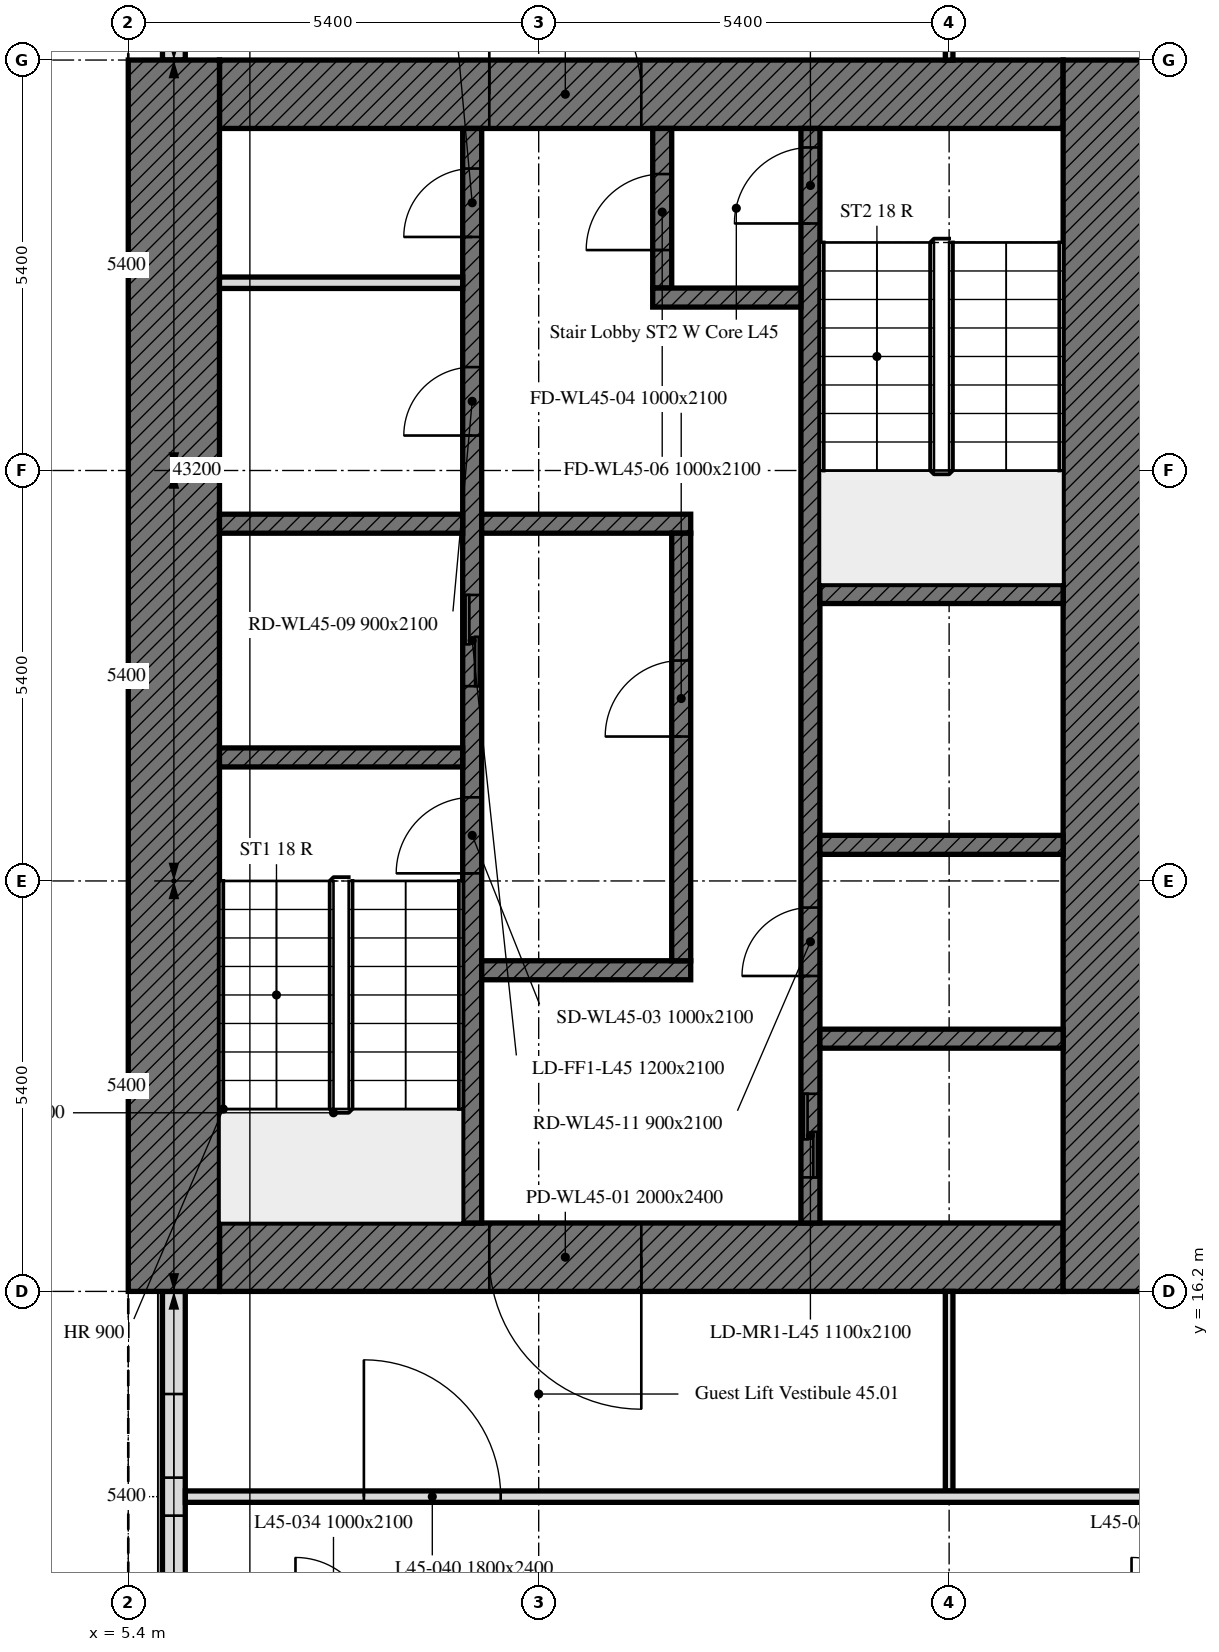
"""IFC4 building model, lengths in metres.
Left out: names, types, materials, properties, quantities, classifications, styles, units other than length and angle.
Written with IfcOpenShell. Run it as: python <this file> out.ifc"""

import sys

from ifc_helpers import new_model, si_unit, direction, frame, frame_2d, origin, place, context, subcontext, project, spatial, rectangle, extrude, element, fill, save


model = new_model("IFC4")
c1 = context("Model", 3, precision=1e-05, world=origin(), true_north=direction((0.0, 1.0)))
c2 = subcontext(c1, "Body", "Model", "MODEL_VIEW")
j1 = project(units=[si_unit("LENGTHUNIT", "METRE"), si_unit("PLANEANGLEUNIT", "RADIAN")], contexts=[c1])
p1 = place(None, origin())
s1 = spatial("IfcSite", under=j1, at=p1, CompositionType="ELEMENT")
p2 = place(p1, origin())
s2 = spatial("IfcBuilding", under=s1, at=p2, CompositionType="ELEMENT")
p3 = place(p2, frame((0.0, 0.0, 187.3)))
s3 = spatial("IfcBuildingStorey", under=s2, at=p3, CompositionType="ELEMENT", Elevation=187.3)
p4 = place(p3, frame((6.0, 43.014, 0.0), z_axis=(0.0, 0.0, 1.0), x_axis=(0.0, -1.0, 0.0)))
e1 = element("IfcWall", 1, at=p4, inside=s3, PredefinedType="SOLIDWALL", context=c2, shape_type="SweptSolid", body=[
    extrude(rectangle(XDim=10.614, YDim=0.3, at=frame_2d((5.307, 0.0))), origin(), (0.0, 0.0, 1.0), 3.0),
])
p5 = place(p4, frame((1.164, 0.0, 0.9)))
e2 = element("IfcOpeningElement", 2, at=p5, cuts=e1, PredefinedType="OPENING", context=c2, shape_type="SweptSolid", body=[
    extrude(rectangle(XDim=1.1, YDim=1.7, at=frame_2d((0.55, 0.85))), frame((0.0, 0.16, 0.0), z_axis=(0.0, -1.0, 0.0), x_axis=(1.0, 0.0, 0.0)), (0.0, 0.0, 1.0), 0.32),
])
p6 = place(p4, frame((2.764, 0.0, 0.9)))
e3 = element("IfcOpeningElement", 3, at=p6, cuts=e1, PredefinedType="OPENING", context=c2, shape_type="SweptSolid", body=[
    extrude(rectangle(XDim=1.1, YDim=1.7, at=frame_2d((0.55, 0.85))), frame((0.0, 0.16, 0.0), z_axis=(0.0, -1.0, 0.0), x_axis=(1.0, 0.0, 0.0)), (0.0, 0.0, 1.0), 0.32),
])
p7 = place(p4, frame((6.564, 0.0, 0.9)))
e4 = element("IfcOpeningElement", 4, at=p7, cuts=e1, PredefinedType="OPENING", context=c2, shape_type="SweptSolid", body=[
    extrude(rectangle(XDim=1.1, YDim=1.7, at=frame_2d((0.55, 0.85))), frame((0.0, 0.16, 0.0), z_axis=(0.0, -1.0, 0.0), x_axis=(1.0, 0.0, 0.0)), (0.0, 0.0, 1.0), 0.32),
])
p8 = place(p4, frame((8.164, 0.0, 0.9)))
e5 = element("IfcOpeningElement", 5, at=p8, cuts=e1, PredefinedType="OPENING", context=c2, shape_type="SweptSolid", body=[
    extrude(rectangle(XDim=1.1, YDim=1.7, at=frame_2d((0.55, 0.85))), frame((0.0, 0.16, 0.0), z_axis=(0.0, -1.0, 0.0), x_axis=(1.0, 0.0, 0.0)), (0.0, 0.0, 1.0), 0.32),
])
p9 = place(p3, frame((6.0, 16.2, 0.0), z_axis=(0.0, 0.0, 1.0), x_axis=(0.0, -1.0, 0.0)))
e6 = element("IfcWall", 6, at=p9, inside=s3, PredefinedType="SOLIDWALL", context=c2, shape_type="SweptSolid", body=[
    extrude(rectangle(XDim=5.214, YDim=0.3, at=frame_2d((2.607, 0.0))), origin(), (0.0, 0.0, 1.0), 3.0),
])
p10 = place(p9, frame((1.35, 0.0, 0.9)))
e7 = element("IfcOpeningElement", 7, at=p10, cuts=e6, PredefinedType="OPENING", context=c2, shape_type="SweptSolid", body=[
    extrude(rectangle(XDim=1.1, YDim=1.7, at=frame_2d((0.55, 0.85))), frame((0.0, 0.16, 0.0), z_axis=(0.0, -1.0, 0.0), x_axis=(1.0, 0.0, 0.0)), (0.0, 0.0, 1.0), 0.32),
])
p11 = place(p9, frame((2.95, 0.0, 0.9)))
e8 = element("IfcOpeningElement", 8, at=p11, cuts=e6, PredefinedType="OPENING", context=c2, shape_type="SweptSolid", body=[
    extrude(rectangle(XDim=1.1, YDim=1.7, at=frame_2d((0.55, 0.85))), frame((0.0, 0.16, 0.0), z_axis=(0.0, -1.0, 0.0), x_axis=(1.0, 0.0, 0.0)), (0.0, 0.0, 1.0), 0.32),
])
p12 = place(p3, frame((17.7, 16.65, 0.0), z_axis=(0.0, 0.0, 1.0), x_axis=(-1.0, 0.0, 0.0)))
e9 = element("IfcWall", 9, at=p12, inside=s3, PredefinedType="SOLIDWALL", context=c2, shape_type="SweptSolid", body=[
    extrude(rectangle(XDim=11.1, YDim=0.9, at=frame_2d((5.55, 0.0))), origin(), (0.0, 0.0, 1.0), 3.0),
])
p13 = place(p12, frame((5.55, 0.0, 0.0)))
e10 = element("IfcOpeningElement", 10, at=p13, cuts=e9, PredefinedType="OPENING", context=c2, shape_type="SweptSolid", body=[
    extrude(rectangle(XDim=2.0, YDim=2.4, at=frame_2d((1.0, 1.2))), frame((0.0, 0.45, 0.0), z_axis=(0.0, -1.0, 0.0), x_axis=(1.0, 0.0, 0.0)), (0.0, 0.0, 1.0), 0.9),
])
p14 = place(p3, frame((6.6, 31.95, 0.0), z_axis=(0.0, 0.0, 1.0), x_axis=(1.0, 0.0, 0.0)))
e11 = element("IfcWall", 11, at=p14, inside=s3, PredefinedType="SOLIDWALL", context=c2, shape_type="SweptSolid", body=[
    extrude(rectangle(XDim=11.1, YDim=0.9, at=frame_2d((5.55, 0.0))), origin(), (0.0, 0.0, 1.0), 3.0),
])
p15 = place(p14, frame((3.55, 0.0, 0.0)))
e12 = element("IfcOpeningElement", 12, at=p15, cuts=e11, PredefinedType="OPENING", context=c2, shape_type="SweptSolid", body=[
    extrude(rectangle(XDim=2.0, YDim=2.4, at=frame_2d((1.0, 1.2))), frame((0.0, 0.45, 0.0), z_axis=(0.0, -1.0, 0.0), x_axis=(1.0, 0.0, 0.0)), (0.0, 0.0, 1.0), 0.9),
])
for number, where, z_axis, x_axis in (
    (13, (6.0, 16.2, 0.0), (0.0, 0.0, 1.0), (0.0, 1.0, 0.0)),
    (14, (18.3, 32.4, 0.0), (0.0, 0.0, 1.0), (0.0, -1.0, 0.0)),
):
    element("IfcWall", number, at=place(p3, frame(where, z_axis=z_axis, x_axis=x_axis)), inside=s3, PredefinedType="SOLIDWALL", context=c2, shape_type="SweptSolid", body=[
        extrude(rectangle(XDim=16.2, YDim=1.2, at=frame_2d((8.1, 0.0))), origin(), (0.0, 0.0, 1.0), 3.0),
    ])
p16 = place(p3, frame((9.925, 17.1, 0.0), z_axis=(0.0, 0.0, 1.0), x_axis=(0.0, 1.0, 0.0)))
e15 = element("IfcWall", 15, at=p16, inside=s3, PredefinedType="SOLIDWALL", context=c2, shape_type="SweptSolid", body=[
    extrude(rectangle(XDim=14.4, YDim=0.25, at=frame_2d((7.2, 0.0))), origin(), (0.0, 0.0, 1.0), 3.0),
])
p17 = place(p16, frame((4.6, 0.0, 0.0)))
e16 = element("IfcOpeningElement", 16, at=p17, cuts=e15, PredefinedType="OPENING", context=c2, shape_type="SweptSolid", body=[
    extrude(rectangle(XDim=1.0, YDim=2.1, at=frame_2d((0.5, 1.05))), frame((0.0, 0.125, 0.0), z_axis=(0.0, -1.0, 0.0), x_axis=(1.0, 0.0, 0.0)), (0.0, 0.0, 1.0), 0.25),
])
p18 = place(p16, frame((7.062, 0.0, 0.0)))
e17 = element("IfcOpeningElement", 17, at=p18, cuts=e15, PredefinedType="OPENING", context=c2, shape_type="SweptSolid", body=[
    extrude(rectangle(XDim=1.2, YDim=2.1, at=frame_2d((0.6, 1.05))), frame((0.0, 0.125, 0.0), z_axis=(0.0, -1.0, 0.0), x_axis=(1.0, 0.0, 0.0)), (0.0, 0.0, 1.0), 0.25),
])
p19 = place(p16, frame((10.36, 0.0, 0.0)))
e18 = element("IfcOpeningElement", 18, at=p19, cuts=e15, PredefinedType="OPENING", context=c2, shape_type="SweptSolid", body=[
    extrude(rectangle(XDim=0.9, YDim=2.1, at=frame_2d((0.45, 1.05))), frame((0.0, 0.125, 0.0), z_axis=(0.0, -1.0, 0.0), x_axis=(1.0, 0.0, 0.0)), (0.0, 0.0, 1.0), 0.25),
])
p20 = place(p16, frame((12.972, 0.0, 0.0)))
e19 = element("IfcOpeningElement", 19, at=p20, cuts=e15, PredefinedType="OPENING", context=c2, shape_type="SweptSolid", body=[
    extrude(rectangle(XDim=0.9, YDim=2.1, at=frame_2d((0.45, 1.05))), frame((0.0, 0.125, 0.0), z_axis=(0.0, -1.0, 0.0), x_axis=(1.0, 0.0, 0.0)), (0.0, 0.0, 1.0), 0.25),
])
p21 = place(p3, frame((14.375, 17.1, 0.0), z_axis=(0.0, 0.0, 1.0), x_axis=(0.0, 1.0, 0.0)))
e20 = element("IfcWall", 20, at=p21, inside=s3, PredefinedType="SOLIDWALL", context=c2, shape_type="SweptSolid", body=[
    extrude(rectangle(XDim=14.4, YDim=0.25, at=frame_2d((7.2, 0.0))), origin(), (0.0, 0.0, 1.0), 3.0),
])
p22 = place(p21, frame((13.15, 0.0, 0.0)))
e21 = element("IfcOpeningElement", 21, at=p22, cuts=e20, PredefinedType="OPENING", context=c2, shape_type="SweptSolid", body=[
    extrude(rectangle(XDim=1.0, YDim=2.1, at=frame_2d((0.5, 1.05))), frame((0.0, 0.125, 0.0), z_axis=(0.0, -1.0, 0.0), x_axis=(1.0, 0.0, 0.0)), (0.0, 0.0, 1.0), 0.25),
])
p23 = place(p21, frame((0.6, 0.0, 0.0)))
e22 = element("IfcOpeningElement", 22, at=p23, cuts=e20, PredefinedType="OPENING", context=c2, shape_type="SweptSolid", body=[
    extrude(rectangle(XDim=1.1, YDim=2.1, at=frame_2d((0.55, 1.05))), frame((0.0, 0.125, 0.0), z_axis=(0.0, -1.0, 0.0), x_axis=(1.0, 0.0, 0.0)), (0.0, 0.0, 1.0), 0.25),
])
p24 = place(p21, frame((3.25, 0.0, 0.0)))
e23 = element("IfcOpeningElement", 23, at=p24, cuts=e20, PredefinedType="OPENING", context=c2, shape_type="SweptSolid", body=[
    extrude(rectangle(XDim=0.9, YDim=2.1, at=frame_2d((0.45, 1.05))), frame((0.0, 0.125, 0.0), z_axis=(0.0, -1.0, 0.0), x_axis=(1.0, 0.0, 0.0)), (0.0, 0.0, 1.0), 0.25),
])
for number, where, z_axis, x_axis in (
    (24, (6.6, 23.225, 0.0), (0.0, 0.0, 1.0), (1.0, 0.0, 0.0)),
    (25, (14.5, 25.375, 0.0), (0.0, 0.0, 1.0), (1.0, 0.0, 0.0)),
    (26, (14.5, 22.075, 0.0), (0.0, 0.0, 1.0), (1.0, 0.0, 0.0)),
    (27, (6.6, 26.3, 0.0), (0.0, 0.0, 1.0), (1.0, 0.0, 0.0)),
):
    element("IfcWall", number, at=place(p3, frame(where, z_axis=z_axis, x_axis=x_axis)), inside=s3, PredefinedType="SOLIDWALL", context=c2, shape_type="SweptSolid", body=[
        extrude(rectangle(XDim=3.2, YDim=0.25, at=frame_2d((1.6, 0.0))), origin(), (0.0, 0.0, 1.0), 3.0),
    ])
for number, where, z_axis, x_axis in (
    (28, (10.05, 26.3, 0.0), (0.0, 0.0, 1.0), (1.0, 0.0, 0.0)),
    (29, (10.05, 20.425, 0.0), (0.0, 0.0, 1.0), (1.0, 0.0, 0.0)),
):
    element("IfcWall", number, at=place(p3, frame(where, z_axis=z_axis, x_axis=x_axis)), inside=s3, PredefinedType="SOLIDWALL", context=c2, shape_type="SweptSolid", body=[
        extrude(rectangle(XDim=2.75, YDim=0.25, at=frame_2d((1.375, 0.0))), origin(), (0.0, 0.0, 1.0), 3.0),
    ])
p25 = place(p3, frame((12.425, 29.4, 0.0), z_axis=(0.0, 0.0, 1.0), x_axis=(0.0, 1.0, 0.0)))
e30 = element("IfcWall", 30, at=p25, inside=s3, PredefinedType="SOLIDWALL", context=c2, shape_type="SweptSolid", body=[
    extrude(rectangle(XDim=2.1, YDim=0.25, at=frame_2d((1.05, 0.0))), origin(), (0.0, 0.0, 1.0), 3.0),
])
p26 = place(p25, frame((0.5, 0.0, 0.0)))
e31 = element("IfcOpeningElement", 31, at=p26, cuts=e30, PredefinedType="OPENING", context=c2, shape_type="SweptSolid", body=[
    extrude(rectangle(XDim=1.0, YDim=2.1, at=frame_2d((0.5, 1.05))), frame((0.0, 0.125, 0.0), z_axis=(0.0, -1.0, 0.0), x_axis=(1.0, 0.0, 0.0)), (0.0, 0.0, 1.0), 0.25),
])
p27 = place(p3, frame((12.3, 29.275, 0.0), z_axis=(0.0, 0.0, 1.0), x_axis=(1.0, 0.0, 0.0)))
e32 = element("IfcWall", 32, at=p27, inside=s3, PredefinedType="SOLIDWALL", context=c2, shape_type="SweptSolid", body=[
    extrude(rectangle(XDim=1.95, YDim=0.25, at=frame_2d((0.975, 0.0))), origin(), (0.0, 0.0, 1.0), 3.0),
])
p28 = place(p3, frame((12.675, 20.55, 0.0), z_axis=(0.0, 0.0, 1.0), x_axis=(0.0, 1.0, 0.0)))
e33 = element("IfcWall", 33, at=p28, inside=s3, PredefinedType="SOLIDWALL", context=c2, shape_type="SweptSolid", body=[
    extrude(rectangle(XDim=5.625, YDim=0.25, at=frame_2d((2.812, 0.0))), origin(), (0.0, 0.0, 1.0), 3.0),
])
p29 = place(p28, frame((2.95, 0.0, 0.0)))
e34 = element("IfcOpeningElement", 34, at=p29, cuts=e33, PredefinedType="OPENING", context=c2, shape_type="SweptSolid", body=[
    extrude(rectangle(XDim=1.0, YDim=2.1, at=frame_2d((0.5, 1.05))), frame((0.0, 0.125, 0.0), z_axis=(0.0, -1.0, 0.0), x_axis=(1.0, 0.0, 0.0)), (0.0, 0.0, 1.0), 0.25),
])
p30 = place(p3, frame((14.5, 19.525, 0.0), z_axis=(0.0, 0.0, 1.0), x_axis=(1.0, 0.0, 0.0)))
e35 = element("IfcWall", 35, at=p30, inside=s3, PredefinedType="SOLIDWALL", context=c2, shape_type="SweptSolid", body=[
    extrude(rectangle(XDim=3.2, YDim=0.25, at=frame_2d((1.6, 0.0))), origin(), (0.0, 0.0, 1.0), 3.0),
])
p31 = place(p3, frame((6.6, 29.47, 0.0), z_axis=(0.0, 0.0, 1.0), x_axis=(1.0, 0.0, 0.0)))
e36 = element("IfcWall", 36, at=p31, inside=s3, PredefinedType="PARTITIONING", context=c2, shape_type="SweptSolid", body=[
    extrude(rectangle(XDim=3.2, YDim=0.15, at=frame_2d((1.6, 0.0))), origin(), (0.0, 0.0, 1.0), 3.0),
])
p32 = place(p3, frame((16.2, 37.38, 0.0), z_axis=(0.0, 0.0, 1.0), x_axis=(0.0, -1.0, 0.0)))
e37 = element("IfcWall", 37, at=p32, inside=s3, PredefinedType="PARTITIONING", context=c2, shape_type="SweptSolid", body=[
    extrude(rectangle(XDim=4.98, YDim=0.1, at=frame_2d((2.49, 0.0))), origin(), (0.0, 0.0, 1.0), 2.4),
])
p33 = place(p3, frame((16.2, 16.2, 0.0), z_axis=(0.0, 0.0, 1.0), x_axis=(0.0, -1.0, 0.0)))
e38 = element("IfcWall", 38, at=p33, inside=s3, PredefinedType="PARTITIONING", context=c2, shape_type="SweptSolid", body=[
    extrude(rectangle(XDim=2.625, YDim=0.1, at=frame_2d((1.312, 0.0))), origin(), (0.0, 0.0, 1.0), 3.0),
])
p34 = place(p3, frame((6.151, 13.5, 0.0), z_axis=(0.0, 0.0, 1.0), x_axis=(1.0, 0.0, 0.0)))
e39 = element("IfcWall", 39, at=p34, inside=s3, PredefinedType="PARTITIONING", context=c2, shape_type="SweptSolid", body=[
    extrude(rectangle(XDim=37.124, YDim=0.15, at=frame_2d((18.562, 0.0))), origin(), (0.0, 0.0, 1.0), 3.0),
])
p35 = place(p34, frame((17.649, 0.0, 0.0)))
e40 = element("IfcOpeningElement", 40, at=p35, cuts=e39, PredefinedType="OPENING", context=c2, shape_type="SweptSolid", body=[
    extrude(rectangle(XDim=1.0, YDim=2.1, at=frame_2d((0.5, 1.05))), frame((0.0, 0.075, 0.0), z_axis=(0.0, -1.0, 0.0), x_axis=(1.0, 0.0, 0.0)), (0.0, 0.0, 1.0), 0.15),
])
p36 = place(p34, frame((2.349, 0.0, 0.0)))
e41 = element("IfcOpeningElement", 41, at=p36, cuts=e39, PredefinedType="OPENING", context=c2, shape_type="SweptSolid", body=[
    extrude(rectangle(XDim=1.8, YDim=2.4, at=frame_2d((0.9, 1.2))), frame((0.0, 0.075, 0.0), z_axis=(0.0, -1.0, 0.0), x_axis=(1.0, 0.0, 0.0)), (0.0, 0.0, 1.0), 0.15),
])
p37 = place(p34, frame((29.349, 0.0, 0.0)))
e42 = element("IfcOpeningElement", 42, at=p37, cuts=e39, PredefinedType="OPENING", context=c2, shape_type="SweptSolid", body=[
    extrude(rectangle(XDim=1.8, YDim=2.4, at=frame_2d((0.9, 1.2))), frame((0.0, 0.075, 0.0), z_axis=(0.0, -1.0, 0.0), x_axis=(1.0, 0.0, 0.0)), (0.0, 0.0, 1.0), 0.15),
])
p38 = place(p10, origin())
e43 = element("IfcWindow", 43, at=p38, inside=s3, PartitioningType="SINGLE_PANEL", PredefinedType="WINDOW", context=c2, shape_type="SweptSolid", body=[
    extrude(rectangle(XDim=1.1, YDim=1.7, at=frame_2d((0.55, 0.85))), frame((0.0, 0.03, 0.0), z_axis=(0.0, -1.0, 0.0), x_axis=(1.0, 0.0, 0.0)), (0.0, 0.0, 1.0), 0.06),
])
fill(e7, e43)
p39 = place(p11, origin())
e44 = element("IfcWindow", 44, at=p39, inside=s3, PartitioningType="SINGLE_PANEL", PredefinedType="WINDOW", context=c2, shape_type="SweptSolid", body=[
    extrude(rectangle(XDim=1.1, YDim=1.7, at=frame_2d((0.55, 0.85))), frame((0.0, 0.03, 0.0), z_axis=(0.0, -1.0, 0.0), x_axis=(1.0, 0.0, 0.0)), (0.0, 0.0, 1.0), 0.06),
])
fill(e8, e44)
p40 = place(p13, origin())
e45 = element("IfcDoor", 45, at=p40, inside=s3, OperationType="DOUBLE_DOOR_SINGLE_SWING", PredefinedType="DOOR", context=c2, shape_type="SweptSolid", body=[
    extrude(rectangle(XDim=2.0, YDim=2.4, at=frame_2d((1.0, 1.2))), frame((0.0, 0.025, 0.0), z_axis=(0.0, -1.0, 0.0), x_axis=(1.0, 0.0, 0.0)), (0.0, 0.0, 1.0), 0.05),
])
fill(e10, e45)
p41 = place(p15, origin())
e46 = element("IfcDoor", 46, at=p41, inside=s3, OperationType="DOUBLE_DOOR_SINGLE_SWING", PredefinedType="DOOR", context=c2, shape_type="SweptSolid", body=[
    extrude(rectangle(XDim=2.0, YDim=2.4, at=frame_2d((1.0, 1.2))), frame((0.0, 0.025, 0.0), z_axis=(0.0, -1.0, 0.0), x_axis=(1.0, 0.0, 0.0)), (0.0, 0.0, 1.0), 0.05),
])
fill(e12, e46)
p42 = place(p17, origin())
e47 = element("IfcDoor", 47, at=p42, inside=s3, OperationType="SINGLE_SWING_LEFT", PredefinedType="DOOR", context=c2, shape_type="SweptSolid", body=[
    extrude(rectangle(XDim=1.0, YDim=2.1, at=frame_2d((0.5, 1.05))), frame((0.0, 0.025, 0.0), z_axis=(0.0, -1.0, 0.0), x_axis=(1.0, 0.0, 0.0)), (0.0, 0.0, 1.0), 0.05),
])
fill(e16, e47)
p43 = place(p29, origin())
e48 = element("IfcDoor", 48, at=p43, inside=s3, OperationType="SINGLE_SWING_LEFT", PredefinedType="DOOR", context=c2, shape_type="SweptSolid", body=[
    extrude(rectangle(XDim=1.0, YDim=2.1, at=frame_2d((0.5, 1.05))), frame((0.0, 0.025, 0.0), z_axis=(0.0, -1.0, 0.0), x_axis=(1.0, 0.0, 0.0)), (0.0, 0.0, 1.0), 0.05),
])
fill(e34, e48)
p44 = place(p22, origin())
e49 = element("IfcDoor", 49, at=p44, inside=s3, OperationType="SINGLE_SWING_LEFT", PredefinedType="DOOR", context=c2, shape_type="SweptSolid", body=[
    extrude(rectangle(XDim=1.0, YDim=2.1, at=frame_2d((0.5, 1.05))), frame((0.0, 0.025, 0.0), z_axis=(0.0, -1.0, 0.0), x_axis=(1.0, 0.0, 0.0)), (0.0, 0.0, 1.0), 0.05),
])
fill(e21, e49)
p45 = place(p26, origin())
e50 = element("IfcDoor", 50, at=p45, inside=s3, OperationType="SINGLE_SWING_LEFT", PredefinedType="DOOR", context=c2, shape_type="SweptSolid", body=[
    extrude(rectangle(XDim=1.0, YDim=2.1, at=frame_2d((0.5, 1.05))), frame((0.0, 0.025, 0.0), z_axis=(0.0, -1.0, 0.0), x_axis=(1.0, 0.0, 0.0)), (0.0, 0.0, 1.0), 0.05),
])
fill(e31, e50)
p46 = place(p18, origin())
e51 = element("IfcDoor", 51, at=p46, inside=s3, OperationType="DOUBLE_DOOR_SLIDING", PredefinedType="DOOR", context=c2, shape_type="SweptSolid", body=[
    extrude(rectangle(XDim=1.2, YDim=2.1, at=frame_2d((0.6, 1.05))), frame((0.0, 0.025, 0.0), z_axis=(0.0, -1.0, 0.0), x_axis=(1.0, 0.0, 0.0)), (0.0, 0.0, 1.0), 0.05),
])
fill(e17, e51)
p47 = place(p23, origin())
e52 = element("IfcDoor", 52, at=p47, inside=s3, OperationType="DOUBLE_DOOR_SLIDING", PredefinedType="DOOR", context=c2, shape_type="SweptSolid", body=[
    extrude(rectangle(XDim=1.1, YDim=2.1, at=frame_2d((0.55, 1.05))), frame((0.0, 0.025, 0.0), z_axis=(0.0, -1.0, 0.0), x_axis=(1.0, 0.0, 0.0)), (0.0, 0.0, 1.0), 0.05),
])
fill(e22, e52)
p48 = place(p19, origin())
e53 = element("IfcDoor", 53, at=p48, inside=s3, OperationType="SINGLE_SWING_LEFT", PredefinedType="DOOR", context=c2, shape_type="SweptSolid", body=[
    extrude(rectangle(XDim=0.9, YDim=2.1, at=frame_2d((0.45, 1.05))), frame((0.0, 0.025, 0.0), z_axis=(0.0, -1.0, 0.0), x_axis=(1.0, 0.0, 0.0)), (0.0, 0.0, 1.0), 0.05),
])
fill(e18, e53)
p49 = place(p20, origin())
e54 = element("IfcDoor", 54, at=p49, inside=s3, OperationType="SINGLE_SWING_LEFT", PredefinedType="DOOR", context=c2, shape_type="SweptSolid", body=[
    extrude(rectangle(XDim=0.9, YDim=2.1, at=frame_2d((0.45, 1.05))), frame((0.0, 0.025, 0.0), z_axis=(0.0, -1.0, 0.0), x_axis=(1.0, 0.0, 0.0)), (0.0, 0.0, 1.0), 0.05),
])
fill(e19, e54)
p50 = place(p24, origin())
e55 = element("IfcDoor", 55, at=p50, inside=s3, OperationType="SINGLE_SWING_LEFT", PredefinedType="DOOR", context=c2, shape_type="SweptSolid", body=[
    extrude(rectangle(XDim=0.9, YDim=2.1, at=frame_2d((0.45, 1.05))), frame((0.0, 0.025, 0.0), z_axis=(0.0, -1.0, 0.0), x_axis=(1.0, 0.0, 0.0)), (0.0, 0.0, 1.0), 0.05),
])
fill(e23, e55)
p51 = place(p36, origin())
e56 = element("IfcDoor", 56, at=p51, inside=s3, OperationType="DOUBLE_DOOR_SINGLE_SWING", PredefinedType="DOOR", context=c2, shape_type="SweptSolid", body=[
    extrude(rectangle(XDim=1.8, YDim=2.4, at=frame_2d((0.9, 1.2))), frame((0.0, 0.025, 0.0), z_axis=(0.0, -1.0, 0.0), x_axis=(1.0, 0.0, 0.0)), (0.0, 0.0, 1.0), 0.05),
])
fill(e41, e56)
save(model, sys.argv[1])
